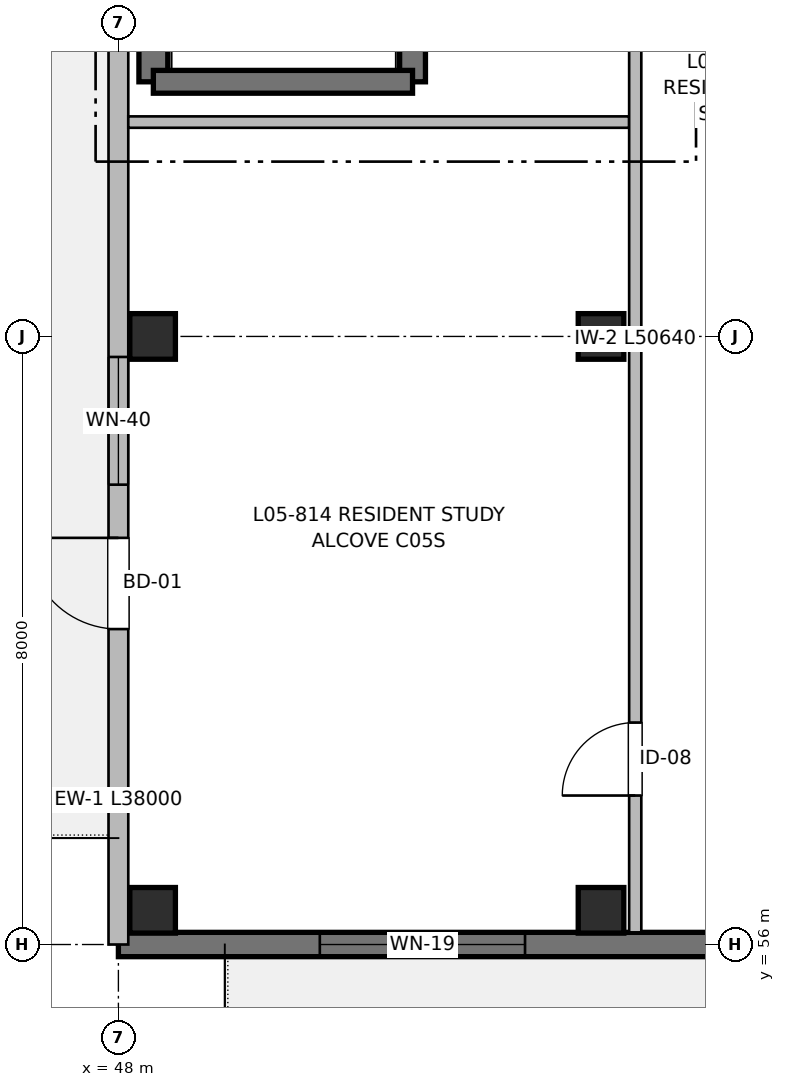
"""IFC4 building model, lengths in metres.
Left out: names, types, materials, properties, quantities, classifications, styles, units other than length and angle.
Written with IfcOpenShell. Run it as: python <this file> out.ifc"""

import sys

from ifc_helpers import new_model, si_unit, direction, frame, frame_2d, origin, origin_2d, place, context, subcontext, project, spatial, rectangle, extrude, element, fill, save


model = new_model("IFC4")
c1 = context("Model", 3, precision=1e-05, world=origin(), true_north=direction((0.0, 1.0)))
c2 = subcontext(c1, "Body", "Model", "MODEL_VIEW")
j1 = project(units=[si_unit("LENGTHUNIT", "METRE"), si_unit("PLANEANGLEUNIT", "RADIAN")], contexts=[c1])
p1 = place(None, origin())
s1 = spatial("IfcSite", under=j1, at=p1, CompositionType="ELEMENT")
p2 = place(p1, origin())
s2 = spatial("IfcBuilding", under=s1, at=p2, CompositionType="ELEMENT")
p3 = place(p2, frame((0.0, 0.0, 16.96)))
s3 = spatial("IfcBuildingStorey", under=s2, at=p3, CompositionType="ELEMENT", Elevation=16.96)
for number, where, z_axis, x_axis in (
    (1, (48.45, 56.45, 0.0), (0.0, 0.0, 1.0), (1.0, 0.0, 0.0)),
    (2, (48.45, 64.0, 0.0), (0.0, 0.0, 1.0), (1.0, 0.0, 0.0)),
    (3, (54.35, 56.45, 0.0), (0.0, 0.0, 1.0), (1.0, 0.0, 0.0)),
    (4, (54.35, 64.0, 0.0), (0.0, 0.0, 1.0), (1.0, 0.0, 0.0)),
):
    element("IfcColumn", number, at=place(p3, frame(where, z_axis=z_axis, x_axis=x_axis)), inside=s3, PredefinedType="COLUMN", context=c2, shape_type="SweptSolid", body=[
        extrude(rectangle(XDim=0.6, YDim=0.6, at=origin_2d()), origin(), (0.0, 0.0, 1.0), 3.2),
    ])
p4 = place(p3, frame((48.46, 67.35, 0.0), z_axis=(0.0, 0.0, 1.0), x_axis=(0.0, 1.0, 0.0)))
e5 = element("IfcWall", 5, at=p4, inside=s3, PredefinedType="SHEAR", context=c2, shape_type="SweptSolid", body=[
    extrude(rectangle(XDim=12.45, YDim=0.38, at=frame_2d((6.225, 0.0))), origin(), (0.0, 0.0, 1.0), 3.2),
])
p5 = place(p4, frame((2.2, 0.0, 0.97)))
e6 = element("IfcOpeningElement", 6, at=p5, cuts=e5, PredefinedType="OPENING", context=c2, shape_type="SweptSolid", body=[
    extrude(rectangle(XDim=0.95, YDim=1.25, at=frame_2d((0.475, 0.625))), frame((0.0, 0.2, 0.0), z_axis=(0.0, -1.0, 0.0), x_axis=(1.0, 0.0, 0.0)), (0.0, 0.0, 1.0), 0.4),
])
p6 = place(p3, frame((51.87, 79.8, 0.0), z_axis=(0.0, 0.0, 1.0), x_axis=(0.0, -1.0, 0.0)))
e7 = element("IfcWall", 7, at=p6, inside=s3, PredefinedType="SHEAR", context=c2, shape_type="SweptSolid", body=[
    extrude(rectangle(XDim=12.45, YDim=0.34, at=frame_2d((6.225, 0.0))), origin(), (0.0, 0.0, 1.0), 3.2),
])
p7 = place(p6, frame((10.85, 0.0, 0.0)))
e8 = element("IfcOpeningElement", 8, at=p7, cuts=e7, PredefinedType="OPENING", context=c2, shape_type="SweptSolid", body=[
    extrude(rectangle(XDim=1.05, YDim=2.15, at=frame_2d((0.525, 1.075))), frame((0.0, 0.18, 0.0), z_axis=(0.0, -1.0, 0.0), x_axis=(1.0, 0.0, 0.0)), (0.0, 0.0, 1.0), 0.36),
])
p8 = place(p3, frame((51.87, 67.35, 0.0), z_axis=(0.0, 0.0, 1.0), x_axis=(-1.0, 0.0, 0.0)))
e9 = element("IfcWall", 9, at=p8, inside=s3, PredefinedType="SHEAR", context=c2, shape_type="SweptSolid", body=[
    extrude(rectangle(XDim=3.41, YDim=0.3, at=frame_2d((1.705, 0.0))), origin(), (0.0, 0.0, 1.0), 3.2),
])
p9 = place(p3, frame((64.0, 56.0, 0.0), z_axis=(0.0, 0.0, 1.0), x_axis=(-1.0, 0.0, 0.0)))
e10 = element("IfcWall", 10, at=p9, inside=s3, PredefinedType="SHEAR", context=c2, shape_type="SweptSolid", body=[
    extrude(rectangle(XDim=16.0, YDim=0.32, at=frame_2d((8.0, 0.0))), origin(), (0.0, 0.0, 1.0), 2.98),
])
p10 = place(p9, frame((3.4, 0.0, 0.0)))
e11 = element("IfcOpeningElement", 11, at=p10, cuts=e10, PredefinedType="OPENING", context=c2, shape_type="SweptSolid", body=[
    extrude(rectangle(XDim=1.2, YDim=2.2, at=frame_2d((0.6, 1.1))), frame((0.0, 0.17, 0.0), z_axis=(0.0, -1.0, 0.0), x_axis=(1.0, 0.0, 0.0)), (0.0, 0.0, 1.0), 0.34),
])
p11 = place(p9, frame((4.85, 0.0, 0.72)))
e12 = element("IfcOpeningElement", 12, at=p11, cuts=e10, PredefinedType="OPENING", context=c2, shape_type="SweptSolid", body=[
    extrude(rectangle(XDim=1.68, YDim=1.5, at=frame_2d((0.84, 0.75))), frame((0.0, 0.17, 0.0), z_axis=(0.0, -1.0, 0.0), x_axis=(1.0, 0.0, 0.0)), (0.0, 0.0, 1.0), 0.34),
])
p12 = place(p9, frame((10.65, 0.0, 0.47)))
e13 = element("IfcOpeningElement", 13, at=p12, cuts=e10, PredefinedType="OPENING", context=c2, shape_type="SweptSolid", body=[
    extrude(rectangle(XDim=2.7, YDim=1.75, at=frame_2d((1.35, 0.875))), frame((0.0, 0.17, 0.0), z_axis=(0.0, -1.0, 0.0), x_axis=(1.0, 0.0, 0.0)), (0.0, 0.0, 1.0), 0.34),
])
p13 = place(p3, frame((48.0, 56.0, 0.0), z_axis=(0.0, 0.0, 1.0), x_axis=(0.0, 1.0, 0.0)))
e14 = element("IfcWall", 14, at=p13, inside=s3, PredefinedType="SOLIDWALL", context=c2, shape_type="SweptSolid", body=[
    extrude(rectangle(XDim=38.0, YDim=0.26, at=frame_2d((19.0, 0.0))), origin(), (0.0, 0.0, 1.0), 2.98),
])
p14 = place(p13, frame((4.15, 0.0, 0.0)))
e15 = element("IfcOpeningElement", 15, at=p14, cuts=e14, PredefinedType="OPENING", context=c2, shape_type="SweptSolid", body=[
    extrude(rectangle(XDim=1.2, YDim=2.2, at=frame_2d((0.6, 1.1))), frame((0.0, 0.14, 0.0), z_axis=(0.0, -1.0, 0.0), x_axis=(1.0, 0.0, 0.0)), (0.0, 0.0, 1.0), 0.28),
])
p15 = place(p13, frame((6.05, 0.0, 0.72)))
e16 = element("IfcOpeningElement", 16, at=p15, cuts=e14, PredefinedType="OPENING", context=c2, shape_type="SweptSolid", body=[
    extrude(rectangle(XDim=1.68, YDim=1.5, at=frame_2d((0.84, 0.75))), frame((0.0, 0.14, 0.0), z_axis=(0.0, -1.0, 0.0), x_axis=(1.0, 0.0, 0.0)), (0.0, 0.0, 1.0), 0.28),
])
p16 = place(p13, frame((12.9, 0.0, 0.47)))
e17 = element("IfcOpeningElement", 17, at=p16, cuts=e14, PredefinedType="OPENING", context=c2, shape_type="SweptSolid", body=[
    extrude(rectangle(XDim=2.7, YDim=1.75, at=frame_2d((1.35, 0.875))), frame((0.0, 0.14, 0.0), z_axis=(0.0, -1.0, 0.0), x_axis=(1.0, 0.0, 0.0)), (0.0, 0.0, 1.0), 0.28),
])
p17 = place(p13, frame((24.2, 0.0, 0.72)))
e18 = element("IfcOpeningElement", 18, at=p17, cuts=e14, PredefinedType="OPENING", context=c2, shape_type="SweptSolid", body=[
    extrude(rectangle(XDim=1.7, YDim=1.5, at=frame_2d((0.85, 0.75))), frame((0.0, 0.14, 0.0), z_axis=(0.0, -1.0, 0.0), x_axis=(1.0, 0.0, 0.0)), (0.0, 0.0, 1.0), 0.28),
])
p18 = place(p13, frame((32.1, 0.0, 0.57)))
e19 = element("IfcOpeningElement", 19, at=p18, cuts=e14, PredefinedType="OPENING", context=c2, shape_type="SweptSolid", body=[
    extrude(rectangle(XDim=2.3, YDim=1.65, at=frame_2d((1.15, 0.825))), frame((0.0, 0.14, 0.0), z_axis=(0.0, -1.0, 0.0), x_axis=(1.0, 0.0, 0.0)), (0.0, 0.0, 1.0), 0.28),
])
p19 = place(p3, frame((48.13, 66.82, 0.0), z_axis=(0.0, 0.0, 1.0), x_axis=(1.0, 0.0, 0.0)))
e20 = element("IfcWall", 20, at=p19, inside=s3, PredefinedType="PARTITIONING", context=c2, shape_type="SweptSolid", body=[
    extrude(rectangle(XDim=6.59, YDim=0.15, at=frame_2d((3.295, 0.0))), origin(), (0.0, 0.0, 1.0), 2.935),
])
p20 = place(p3, frame((54.8, 56.16, 0.0), z_axis=(0.0, 0.0, 1.0), x_axis=(0.0, 1.0, 0.0)))
e21 = element("IfcWall", 21, at=p20, inside=s3, PredefinedType="PARTITIONING", context=c2, shape_type="SweptSolid", body=[
    extrude(rectangle(XDim=50.64, YDim=0.16, at=frame_2d((25.32, 0.0))), origin(), (0.0, 0.0, 1.0), 2.935),
])
p21 = place(p20, frame((12.84, 0.0, 0.0)))
e22 = element("IfcOpeningElement", 22, at=p21, cuts=e21, PredefinedType="OPENING", context=c2, shape_type="SweptSolid", body=[
    extrude(rectangle(XDim=1.1, YDim=2.15, at=frame_2d((0.55, 1.075))), frame((0.0, 0.09, 0.0), z_axis=(0.0, -1.0, 0.0), x_axis=(1.0, 0.0, 0.0)), (0.0, 0.0, 1.0), 0.18),
])
p22 = place(p20, frame((19.24, 0.0, 0.0)))
e23 = element("IfcOpeningElement", 23, at=p22, cuts=e21, PredefinedType="OPENING", context=c2, shape_type="SweptSolid", body=[
    extrude(rectangle(XDim=1.6, YDim=2.15, at=frame_2d((0.8, 1.075))), frame((0.0, 0.09, 0.0), z_axis=(0.0, -1.0, 0.0), x_axis=(1.0, 0.0, 0.0)), (0.0, 0.0, 1.0), 0.18),
])
p23 = place(p20, frame((1.8, 0.0, 0.0)))
e24 = element("IfcOpeningElement", 24, at=p23, cuts=e21, PredefinedType="OPENING", context=c2, shape_type="SweptSolid", body=[
    extrude(rectangle(XDim=0.96, YDim=2.15, at=frame_2d((0.48, 1.075))), frame((0.0, 0.09, 0.0), z_axis=(0.0, -1.0, 0.0), x_axis=(1.0, 0.0, 0.0)), (0.0, 0.0, 1.0), 0.18),
])
p24 = place(p20, frame((32.645, 0.0, 0.0)))
e25 = element("IfcOpeningElement", 25, at=p24, cuts=e21, PredefinedType="OPENING", context=c2, shape_type="SweptSolid", body=[
    extrude(rectangle(XDim=0.98, YDim=2.15, at=frame_2d((0.49, 1.075))), frame((0.0, 0.09, 0.0), z_axis=(0.0, -1.0, 0.0), x_axis=(1.0, 0.0, 0.0)), (0.0, 0.0, 1.0), 0.18),
])
p25 = place(p20, frame((41.255, 0.0, 0.0)))
e26 = element("IfcOpeningElement", 26, at=p25, cuts=e21, PredefinedType="OPENING", context=c2, shape_type="SweptSolid", body=[
    extrude(rectangle(XDim=0.98, YDim=2.15, at=frame_2d((0.49, 1.075))), frame((0.0, 0.09, 0.0), z_axis=(0.0, -1.0, 0.0), x_axis=(1.0, 0.0, 0.0)), (0.0, 0.0, 1.0), 0.18),
])
p26 = place(p12, origin())
e27 = element("IfcWindow", 27, at=p26, inside=s3, PartitioningType="SINGLE_PANEL", PredefinedType="WINDOW", context=c2, shape_type="SweptSolid", body=[
    extrude(rectangle(XDim=2.7, YDim=1.75, at=frame_2d((1.35, 0.875))), frame((0.0, 0.03, 0.0), z_axis=(0.0, -1.0, 0.0), x_axis=(1.0, 0.0, 0.0)), (0.0, 0.0, 1.0), 0.06),
])
fill(e13, e27)
p27 = place(p14, origin())
e28 = element("IfcDoor", 28, at=p27, inside=s3, OperationType="SINGLE_SWING_RIGHT", PredefinedType="DOOR", context=c2, shape_type="SweptSolid", body=[
    extrude(rectangle(XDim=1.2, YDim=2.2, at=frame_2d((0.6, 1.1))), frame((0.0, 0.025, 0.0), z_axis=(0.0, -1.0, 0.0), x_axis=(1.0, 0.0, 0.0)), (0.0, 0.0, 1.0), 0.05),
])
fill(e15, e28)
p28 = place(p15, origin())
e29 = element("IfcWindow", 29, at=p28, inside=s3, PartitioningType="SINGLE_PANEL", PredefinedType="WINDOW", context=c2, shape_type="SweptSolid", body=[
    extrude(rectangle(XDim=1.68, YDim=1.5, at=frame_2d((0.84, 0.75))), frame((0.0, 0.03, 0.0), z_axis=(0.0, -1.0, 0.0), x_axis=(1.0, 0.0, 0.0)), (0.0, 0.0, 1.0), 0.06),
])
fill(e16, e29)
p29 = place(p23, origin())
e30 = element("IfcDoor", 30, at=p29, inside=s3, OperationType="SINGLE_SWING_LEFT", PredefinedType="DOOR", context=c2, shape_type="SweptSolid", body=[
    extrude(rectangle(XDim=0.96, YDim=2.15, at=frame_2d((0.48, 1.075))), frame((0.0, 0.025, 0.0), z_axis=(0.0, -1.0, 0.0), x_axis=(1.0, 0.0, 0.0)), (0.0, 0.0, 1.0), 0.05),
])
fill(e24, e30)
save(model, sys.argv[1])
